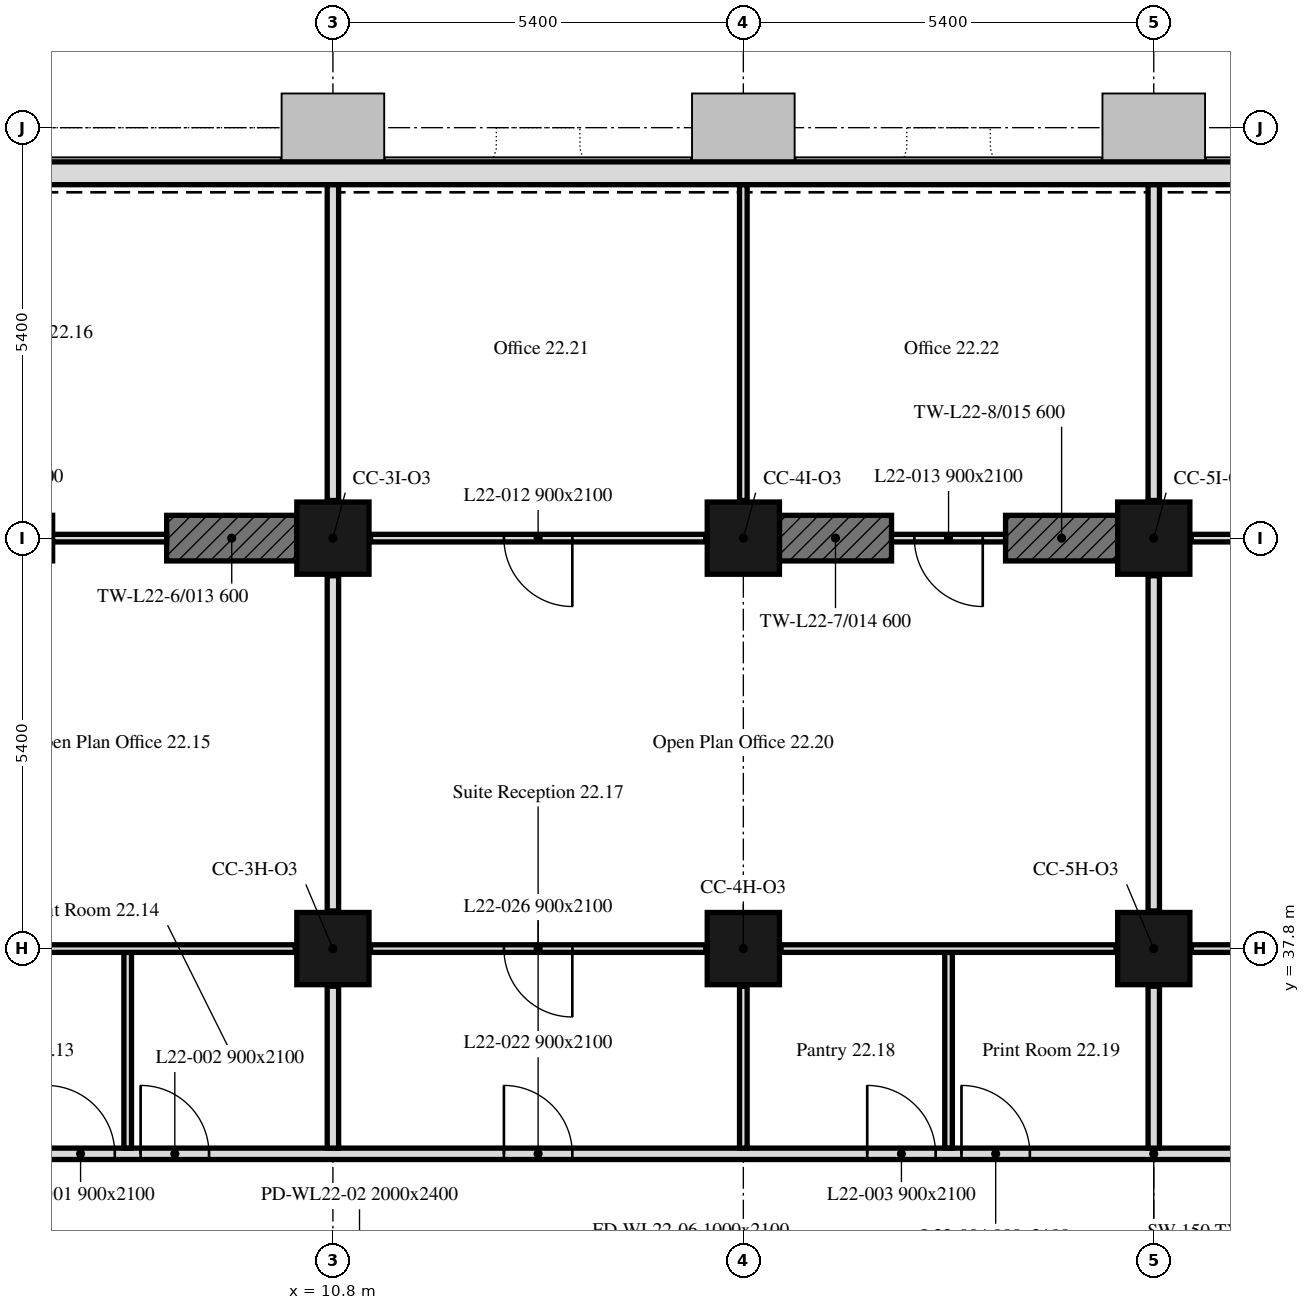
"""IFC4 building model, lengths in metres.
Left out: names, types, materials, properties, quantities, classifications, styles, units other than length and angle.
Written with IfcOpenShell. Run it as: python <this file> out.ifc"""

import sys

from ifc_helpers import new_model, si_unit, direction, frame, frame_2d, origin, origin_2d, place, context, subcontext, project, spatial, rectangle, extrude, element, fill, save


model = new_model("IFC4")
c1 = context("Model", 3, precision=1e-05, world=origin(), true_north=direction((0.0, 1.0)))
c2 = subcontext(c1, "Body", "Model", "MODEL_VIEW")
j1 = project(units=[si_unit("LENGTHUNIT", "METRE"), si_unit("PLANEANGLEUNIT", "RADIAN")], contexts=[c1])
p1 = place(None, origin())
s1 = spatial("IfcSite", under=j1, at=p1, CompositionType="ELEMENT")
p2 = place(p1, origin())
s2 = spatial("IfcBuilding", under=s1, at=p2, CompositionType="ELEMENT")
p3 = place(p2, frame((0.0, 0.0, 95.4)))
s3 = spatial("IfcBuildingStorey", under=s2, at=p3, CompositionType="ELEMENT", Elevation=95.4)
for number, where, z_axis, x_axis in (
    (1, (10.8, 37.8, 0.0), (0.0, 0.0, 1.0), (1.0, 0.0, 0.0)),
    (2, (16.2, 37.8, 0.0), (0.0, 0.0, 1.0), (1.0, 0.0, 0.0)),
    (3, (21.6, 37.8, 0.0), (0.0, 0.0, 1.0), (1.0, 0.0, 0.0)),
    (4, (10.8, 43.2, 0.0), (0.0, 0.0, 1.0), (1.0, 0.0, 0.0)),
    (5, (16.2, 43.2, 0.0), (0.0, 0.0, 1.0), (1.0, 0.0, 0.0)),
    (6, (21.6, 43.2, 0.0), (0.0, 0.0, 1.0), (1.0, 0.0, 0.0)),
):
    element("IfcColumn", number, at=place(p3, frame(where, z_axis=z_axis, x_axis=x_axis)), inside=s3, PredefinedType="COLUMN", context=c2, shape_type="SweptSolid", body=[
        extrude(rectangle(XDim=0.95, YDim=0.95, at=origin_2d()), origin(), (0.0, 0.0, 1.0), 3.5),
    ])
p4 = place(p3, frame((5.4, 43.2, 0.0), z_axis=(0.0, 0.0, 1.0), x_axis=(1.0, 0.0, 0.0)))
e7 = element("IfcWall", 7, at=p4, inside=s3, PredefinedType="SHEAR", context=c2, shape_type="SweptSolid", body=[
    extrude(rectangle(XDim=1.713, YDim=0.6, at=frame_2d((0.856, 0.0))), origin(), (0.0, 0.0, 1.0), 3.5),
])
p5 = place(p3, frame((8.613, 43.2, 0.0), z_axis=(0.0, 0.0, 1.0), x_axis=(1.0, 0.0, 0.0)))
e8 = element("IfcWall", 8, at=p5, inside=s3, PredefinedType="SHEAR", context=c2, shape_type="SweptSolid", body=[
    extrude(rectangle(XDim=1.712, YDim=0.6, at=frame_2d((0.856, 0.0))), origin(), (0.0, 0.0, 1.0), 3.5),
])
p6 = place(p3, frame((16.675, 43.2, 0.0), z_axis=(0.0, 0.0, 1.0), x_axis=(1.0, 0.0, 0.0)))
e9 = element("IfcWall", 9, at=p6, inside=s3, PredefinedType="SHEAR", context=c2, shape_type="SweptSolid", body=[
    extrude(rectangle(XDim=1.475, YDim=0.6, at=frame_2d((0.737, 0.0))), origin(), (0.0, 0.0, 1.0), 3.5),
])
p7 = place(p3, frame((19.65, 43.2, 0.0), z_axis=(0.0, 0.0, 1.0), x_axis=(1.0, 0.0, 0.0)))
e10 = element("IfcWall", 10, at=p7, inside=s3, PredefinedType="SHEAR", context=c2, shape_type="SweptSolid", body=[
    extrude(rectangle(XDim=1.475, YDim=0.6, at=frame_2d((0.738, 0.0))), origin(), (0.0, 0.0, 1.0), 3.5),
])
p8 = place(p3, frame((37.614, 48.0, 0.0), z_axis=(0.0, 0.0, 1.0), x_axis=(-1.0, 0.0, 0.0)))
e11 = element("IfcWall", 11, at=p8, inside=s3, PredefinedType="SOLIDWALL", context=c2, shape_type="SweptSolid", body=[
    extrude(rectangle(XDim=32.027, YDim=0.3, at=frame_2d((16.014, 0.0))), origin(), (0.0, 0.0, 1.0), 3.5),
])
p9 = place(p8, frame((0.814, 0.0, 0.9)))
e12 = element("IfcOpeningElement", 12, at=p9, cuts=e11, PredefinedType="OPENING", context=c2, shape_type="SweptSolid", body=[
    extrude(rectangle(XDim=3.4, YDim=1.7, at=frame_2d((1.7, 0.85))), frame((0.0, 0.16, 0.0), z_axis=(0.0, -1.0, 0.0), x_axis=(1.0, 0.0, 0.0)), (0.0, 0.0, 1.0), 0.32),
])
p10 = place(p3, frame((0.751, 35.1, 0.0), z_axis=(0.0, 0.0, 1.0), x_axis=(1.0, 0.0, 0.0)))
e13 = element("IfcWall", 13, at=p10, inside=s3, PredefinedType="PARTITIONING", context=c2, shape_type="SweptSolid", body=[
    extrude(rectangle(XDim=41.698, YDim=0.15, at=frame_2d((20.849, 0.0))), origin(), (0.0, 0.0, 1.0), 2.75),
])
p11 = place(p10, frame((6.279, 0.0, 0.0)))
e14 = element("IfcOpeningElement", 14, at=p11, cuts=e13, PredefinedType="OPENING", context=c2, shape_type="SweptSolid", body=[
    extrude(rectangle(XDim=0.9, YDim=2.1, at=frame_2d((0.45, 1.05))), frame((0.0, 0.075, 0.0), z_axis=(0.0, -1.0, 0.0), x_axis=(1.0, 0.0, 0.0)), (0.0, 0.0, 1.0), 0.15),
])
p12 = place(p10, frame((7.519, 0.0, 0.0)))
e15 = element("IfcOpeningElement", 15, at=p12, cuts=e13, PredefinedType="OPENING", context=c2, shape_type="SweptSolid", body=[
    extrude(rectangle(XDim=0.9, YDim=2.1, at=frame_2d((0.45, 1.05))), frame((0.0, 0.075, 0.0), z_axis=(0.0, -1.0, 0.0), x_axis=(1.0, 0.0, 0.0)), (0.0, 0.0, 1.0), 0.15),
])
p13 = place(p10, frame((17.079, 0.0, 0.0)))
e16 = element("IfcOpeningElement", 16, at=p13, cuts=e13, PredefinedType="OPENING", context=c2, shape_type="SweptSolid", body=[
    extrude(rectangle(XDim=0.9, YDim=2.1, at=frame_2d((0.45, 1.05))), frame((0.0, 0.075, 0.0), z_axis=(0.0, -1.0, 0.0), x_axis=(1.0, 0.0, 0.0)), (0.0, 0.0, 1.0), 0.15),
])
p14 = place(p10, frame((18.319, 0.0, 0.0)))
e17 = element("IfcOpeningElement", 17, at=p14, cuts=e13, PredefinedType="OPENING", context=c2, shape_type="SweptSolid", body=[
    extrude(rectangle(XDim=0.9, YDim=2.1, at=frame_2d((0.45, 1.05))), frame((0.0, 0.075, 0.0), z_axis=(0.0, -1.0, 0.0), x_axis=(1.0, 0.0, 0.0)), (0.0, 0.0, 1.0), 0.15),
])
p15 = place(p10, frame((38.511, 0.0, 0.0)))
e18 = element("IfcOpeningElement", 18, at=p15, cuts=e13, PredefinedType="OPENING", context=c2, shape_type="SweptSolid", body=[
    extrude(rectangle(XDim=0.9, YDim=2.1, at=frame_2d((0.45, 1.05))), frame((0.0, 0.075, 0.0), z_axis=(0.0, -1.0, 0.0), x_axis=(1.0, 0.0, 0.0)), (0.0, 0.0, 1.0), 0.15),
])
p16 = place(p10, frame((39.919, 0.0, 0.0)))
e19 = element("IfcOpeningElement", 19, at=p16, cuts=e13, PredefinedType="OPENING", context=c2, shape_type="SweptSolid", body=[
    extrude(rectangle(XDim=0.9, YDim=2.1, at=frame_2d((0.45, 1.05))), frame((0.0, 0.075, 0.0), z_axis=(0.0, -1.0, 0.0), x_axis=(1.0, 0.0, 0.0)), (0.0, 0.0, 1.0), 0.15),
])
p17 = place(p10, frame((2.174, 0.0, 0.0)))
e20 = element("IfcOpeningElement", 20, at=p17, cuts=e13, PredefinedType="OPENING", context=c2, shape_type="SweptSolid", body=[
    extrude(rectangle(XDim=0.9, YDim=2.1, at=frame_2d((0.45, 1.05))), frame((0.0, 0.075, 0.0), z_axis=(0.0, -1.0, 0.0), x_axis=(1.0, 0.0, 0.0)), (0.0, 0.0, 1.0), 0.15),
])
p18 = place(p10, frame((12.299, 0.0, 0.0)))
e21 = element("IfcOpeningElement", 21, at=p18, cuts=e13, PredefinedType="OPENING", context=c2, shape_type="SweptSolid", body=[
    extrude(rectangle(XDim=0.9, YDim=2.1, at=frame_2d((0.45, 1.05))), frame((0.0, 0.075, 0.0), z_axis=(0.0, -1.0, 0.0), x_axis=(1.0, 0.0, 0.0)), (0.0, 0.0, 1.0), 0.15),
])
p19 = place(p10, frame((23.099, 0.0, 0.0)))
e22 = element("IfcOpeningElement", 22, at=p19, cuts=e13, PredefinedType="OPENING", context=c2, shape_type="SweptSolid", body=[
    extrude(rectangle(XDim=0.9, YDim=2.1, at=frame_2d((0.45, 1.05))), frame((0.0, 0.075, 0.0), z_axis=(0.0, -1.0, 0.0), x_axis=(1.0, 0.0, 0.0)), (0.0, 0.0, 1.0), 0.15),
])
p20 = place(p3, frame((8.1, 35.175, 0.0), z_axis=(0.0, 0.0, 1.0), x_axis=(0.0, 1.0, 0.0)))
e23 = element("IfcWall", 23, at=p20, inside=s3, PredefinedType="PARTITIONING", context=c2, shape_type="SweptSolid", body=[
    extrude(rectangle(XDim=2.575, YDim=0.1, at=frame_2d((1.288, 0.0))), origin(), (0.0, 0.0, 1.0), 3.5),
])
p21 = place(p3, frame((10.8, 35.175, 0.0), z_axis=(0.0, 0.0, 1.0), x_axis=(0.0, 1.0, 0.0)))
e24 = element("IfcWall", 24, at=p21, inside=s3, PredefinedType="PARTITIONING", context=c2, shape_type="SweptSolid", body=[
    extrude(rectangle(XDim=2.13, YDim=0.15, at=frame_2d((1.065, 0.0))), origin(), (0.0, 0.0, 1.0), 2.75),
])
p22 = place(p3, frame((10.305, 37.8, 0.0), z_axis=(0.0, 0.0, 1.0), x_axis=(-1.0, 0.0, 0.0)))
e25 = element("IfcWall", 25, at=p22, inside=s3, PredefinedType="PARTITIONING", context=c2, shape_type="SweptSolid", body=[
    extrude(rectangle(XDim=4.41, YDim=0.1, at=frame_2d((2.205, 0.0))), origin(), (0.0, 0.0, 1.0), 2.75),
])
p23 = place(p3, frame((8.613, 43.2, 0.0), z_axis=(0.0, 0.0, 1.0), x_axis=(-1.0, 0.0, 0.0)))
e26 = element("IfcWall", 26, at=p23, inside=s3, PredefinedType="PARTITIONING", context=c2, shape_type="SweptSolid", body=[
    extrude(rectangle(XDim=1.5, YDim=0.1, at=frame_2d((0.75, 0.0))), origin(), (0.0, 0.0, 1.0), 3.5),
])
p24 = place(p3, frame((10.8, 38.295, 0.0), z_axis=(0.0, 0.0, 1.0), x_axis=(0.0, 1.0, 0.0)))
e27 = element("IfcWall", 27, at=p24, inside=s3, PredefinedType="PARTITIONING", context=c2, shape_type="SweptSolid", body=[
    extrude(rectangle(XDim=4.41, YDim=0.15, at=frame_2d((2.205, 0.0))), origin(), (0.0, 0.0, 1.0), 2.75),
])
p25 = place(p3, frame((10.8, 43.695, 0.0), z_axis=(0.0, 0.0, 1.0), x_axis=(0.0, 1.0, 0.0)))
e28 = element("IfcWall", 28, at=p25, inside=s3, PredefinedType="PARTITIONING", context=c2, shape_type="SweptSolid", body=[
    extrude(rectangle(XDim=4.154, YDim=0.15, at=frame_2d((2.077, 0.0))), origin(), (0.0, 0.0, 1.0), 2.75),
])
p26 = place(p3, frame((16.2, 35.175, 0.0), z_axis=(0.0, 0.0, 1.0), x_axis=(0.0, 1.0, 0.0)))
e29 = element("IfcWall", 29, at=p26, inside=s3, PredefinedType="PARTITIONING", context=c2, shape_type="SweptSolid", body=[
    extrude(rectangle(XDim=2.13, YDim=0.1, at=frame_2d((1.065, 0.0))), origin(), (0.0, 0.0, 1.0), 2.75),
])
p27 = place(p3, frame((15.705, 37.8, 0.0), z_axis=(0.0, 0.0, 1.0), x_axis=(-1.0, 0.0, 0.0)))
e30 = element("IfcWall", 30, at=p27, inside=s3, PredefinedType="PARTITIONING", context=c2, shape_type="SweptSolid", body=[
    extrude(rectangle(XDim=4.41, YDim=0.1, at=frame_2d((2.205, 0.0))), origin(), (0.0, 0.0, 1.0), 2.75),
])
p28 = place(p27, frame((1.755, 0.0, 0.0)))
e31 = element("IfcOpeningElement", 31, at=p28, cuts=e30, PredefinedType="OPENING", context=c2, shape_type="SweptSolid", body=[
    extrude(rectangle(XDim=0.9, YDim=2.1, at=frame_2d((0.45, 1.05))), frame((0.0, 0.05, 0.0), z_axis=(0.0, -1.0, 0.0), x_axis=(1.0, 0.0, 0.0)), (0.0, 0.0, 1.0), 0.1),
])
p29 = place(p3, frame((18.9, 35.175, 0.0), z_axis=(0.0, 0.0, 1.0), x_axis=(0.0, 1.0, 0.0)))
e32 = element("IfcWall", 32, at=p29, inside=s3, PredefinedType="PARTITIONING", context=c2, shape_type="SweptSolid", body=[
    extrude(rectangle(XDim=2.575, YDim=0.1, at=frame_2d((1.288, 0.0))), origin(), (0.0, 0.0, 1.0), 3.5),
])
p30 = place(p3, frame((21.6, 35.175, 0.0), z_axis=(0.0, 0.0, 1.0), x_axis=(0.0, 1.0, 0.0)))
e33 = element("IfcWall", 33, at=p30, inside=s3, PredefinedType="PARTITIONING", context=c2, shape_type="SweptSolid", body=[
    extrude(rectangle(XDim=2.13, YDim=0.15, at=frame_2d((1.065, 0.0))), origin(), (0.0, 0.0, 1.0), 2.75),
])
p31 = place(p3, frame((21.105, 37.8, 0.0), z_axis=(0.0, 0.0, 1.0), x_axis=(-1.0, 0.0, 0.0)))
e34 = element("IfcWall", 34, at=p31, inside=s3, PredefinedType="PARTITIONING", context=c2, shape_type="SweptSolid", body=[
    extrude(rectangle(XDim=4.41, YDim=0.1, at=frame_2d((2.205, 0.0))), origin(), (0.0, 0.0, 1.0), 3.5),
])
p32 = place(p3, frame((21.6, 38.295, 0.0), z_axis=(0.0, 0.0, 1.0), x_axis=(0.0, 1.0, 0.0)))
e35 = element("IfcWall", 35, at=p32, inside=s3, PredefinedType="PARTITIONING", context=c2, shape_type="SweptSolid", body=[
    extrude(rectangle(XDim=4.41, YDim=0.15, at=frame_2d((2.205, 0.0))), origin(), (0.0, 0.0, 1.0), 2.75),
])
p33 = place(p3, frame((19.65, 43.2, 0.0), z_axis=(0.0, 0.0, 1.0), x_axis=(-1.0, 0.0, 0.0)))
e36 = element("IfcWall", 36, at=p33, inside=s3, PredefinedType="PARTITIONING", context=c2, shape_type="SweptSolid", body=[
    extrude(rectangle(XDim=1.5, YDim=0.1, at=frame_2d((0.75, 0.0))), origin(), (0.0, 0.0, 1.0), 3.5),
])
p34 = place(p33, frame((0.3, 0.0, 0.0)))
e37 = element("IfcOpeningElement", 37, at=p34, cuts=e36, PredefinedType="OPENING", context=c2, shape_type="SweptSolid", body=[
    extrude(rectangle(XDim=0.9, YDim=2.1, at=frame_2d((0.45, 1.05))), frame((0.0, 0.05, 0.0), z_axis=(0.0, -1.0, 0.0), x_axis=(1.0, 0.0, 0.0)), (0.0, 0.0, 1.0), 0.1),
])
p35 = place(p3, frame((15.705, 43.2, 0.0), z_axis=(0.0, 0.0, 1.0), x_axis=(-1.0, 0.0, 0.0)))
e38 = element("IfcWall", 38, at=p35, inside=s3, PredefinedType="PARTITIONING", context=c2, shape_type="SweptSolid", body=[
    extrude(rectangle(XDim=4.41, YDim=0.1, at=frame_2d((2.205, 0.0))), origin(), (0.0, 0.0, 1.0), 3.5),
])
p36 = place(p35, frame((1.755, 0.0, 0.0)))
e39 = element("IfcOpeningElement", 39, at=p36, cuts=e38, PredefinedType="OPENING", context=c2, shape_type="SweptSolid", body=[
    extrude(rectangle(XDim=0.9, YDim=2.1, at=frame_2d((0.45, 1.05))), frame((0.0, 0.05, 0.0), z_axis=(0.0, -1.0, 0.0), x_axis=(1.0, 0.0, 0.0)), (0.0, 0.0, 1.0), 0.1),
])
p37 = place(p3, frame((16.2, 47.849, 0.0), z_axis=(0.0, 0.0, 1.0), x_axis=(0.0, -1.0, 0.0)))
e40 = element("IfcWall", 40, at=p37, inside=s3, PredefinedType="PARTITIONING", context=c2, shape_type="SweptSolid", body=[
    extrude(rectangle(XDim=4.154, YDim=0.1, at=frame_2d((2.077, 0.0))), origin(), (0.0, 0.0, 1.0), 2.75),
])
p38 = place(p3, frame((21.6, 47.849, 0.0), z_axis=(0.0, 0.0, 1.0), x_axis=(0.0, -1.0, 0.0)))
e41 = element("IfcWall", 41, at=p38, inside=s3, PredefinedType="PARTITIONING", context=c2, shape_type="SweptSolid", body=[
    extrude(rectangle(XDim=4.154, YDim=0.15, at=frame_2d((2.077, 0.0))), origin(), (0.0, 0.0, 1.0), 2.75),
])
p39 = place(p3, frame((26.505, 37.8, 0.0), z_axis=(0.0, 0.0, 1.0), x_axis=(-1.0, 0.0, 0.0)))
e42 = element("IfcWall", 42, at=p39, inside=s3, PredefinedType="PARTITIONING", context=c2, shape_type="SweptSolid", body=[
    extrude(rectangle(XDim=4.41, YDim=0.1, at=frame_2d((2.205, 0.0))), origin(), (0.0, 0.0, 1.0), 3.5),
])
p40 = place(p39, frame((1.755, 0.0, 0.0)))
e43 = element("IfcOpeningElement", 43, at=p40, cuts=e42, PredefinedType="OPENING", context=c2, shape_type="SweptSolid", body=[
    extrude(rectangle(XDim=0.9, YDim=2.1, at=frame_2d((0.45, 1.05))), frame((0.0, 0.05, 0.0), z_axis=(0.0, -1.0, 0.0), x_axis=(1.0, 0.0, 0.0)), (0.0, 0.0, 1.0), 0.1),
])
p41 = place(p3, frame((26.505, 43.2, 0.0), z_axis=(0.0, 0.0, 1.0), x_axis=(-1.0, 0.0, 0.0)))
e44 = element("IfcWall", 44, at=p41, inside=s3, PredefinedType="PARTITIONING", context=c2, shape_type="SweptSolid", body=[
    extrude(rectangle(XDim=4.41, YDim=0.1, at=frame_2d((2.205, 0.0))), origin(), (0.0, 0.0, 1.0), 3.5),
])
p42 = place(p41, frame((1.755, 0.0, 0.0)))
e45 = element("IfcOpeningElement", 45, at=p42, cuts=e44, PredefinedType="OPENING", context=c2, shape_type="SweptSolid", body=[
    extrude(rectangle(XDim=0.9, YDim=2.1, at=frame_2d((0.45, 1.05))), frame((0.0, 0.05, 0.0), z_axis=(0.0, -1.0, 0.0), x_axis=(1.0, 0.0, 0.0)), (0.0, 0.0, 1.0), 0.1),
])
p43 = place(p11, origin())
e46 = element("IfcDoor", 46, at=p43, inside=s3, OperationType="SINGLE_SWING_RIGHT", PredefinedType="DOOR", context=c2, shape_type="SweptSolid", body=[
    extrude(rectangle(XDim=0.9, YDim=2.1, at=frame_2d((0.45, 1.05))), frame((0.0, 0.025, 0.0), z_axis=(0.0, -1.0, 0.0), x_axis=(1.0, 0.0, 0.0)), (0.0, 0.0, 1.0), 0.05),
])
fill(e14, e46)
p44 = place(p12, origin())
e47 = element("IfcDoor", 47, at=p44, inside=s3, OperationType="SINGLE_SWING_RIGHT", PredefinedType="DOOR", context=c2, shape_type="SweptSolid", body=[
    extrude(rectangle(XDim=0.9, YDim=2.1, at=frame_2d((0.45, 1.05))), frame((0.0, 0.025, 0.0), z_axis=(0.0, -1.0, 0.0), x_axis=(1.0, 0.0, 0.0)), (0.0, 0.0, 1.0), 0.05),
])
fill(e15, e47)
p45 = place(p13, origin())
e48 = element("IfcDoor", 48, at=p45, inside=s3, OperationType="SINGLE_SWING_RIGHT", PredefinedType="DOOR", context=c2, shape_type="SweptSolid", body=[
    extrude(rectangle(XDim=0.9, YDim=2.1, at=frame_2d((0.45, 1.05))), frame((0.0, 0.025, 0.0), z_axis=(0.0, -1.0, 0.0), x_axis=(1.0, 0.0, 0.0)), (0.0, 0.0, 1.0), 0.05),
])
fill(e16, e48)
p46 = place(p14, origin())
e49 = element("IfcDoor", 49, at=p46, inside=s3, OperationType="SINGLE_SWING_RIGHT", PredefinedType="DOOR", context=c2, shape_type="SweptSolid", body=[
    extrude(rectangle(XDim=0.9, YDim=2.1, at=frame_2d((0.45, 1.05))), frame((0.0, 0.025, 0.0), z_axis=(0.0, -1.0, 0.0), x_axis=(1.0, 0.0, 0.0)), (0.0, 0.0, 1.0), 0.05),
])
fill(e17, e49)
p47 = place(p36, origin())
e50 = element("IfcDoor", 50, at=p47, inside=s3, OperationType="SINGLE_SWING_RIGHT", PredefinedType="DOOR", context=c2, shape_type="SweptSolid", body=[
    extrude(rectangle(XDim=0.9, YDim=2.1, at=frame_2d((0.45, 1.05))), frame((0.0, 0.025, 0.0), z_axis=(0.0, -1.0, 0.0), x_axis=(1.0, 0.0, 0.0)), (0.0, 0.0, 1.0), 0.05),
])
fill(e39, e50)
p48 = place(p34, origin())
e51 = element("IfcDoor", 51, at=p48, inside=s3, OperationType="SINGLE_SWING_RIGHT", PredefinedType="DOOR", context=c2, shape_type="SweptSolid", body=[
    extrude(rectangle(XDim=0.9, YDim=2.1, at=frame_2d((0.45, 1.05))), frame((0.0, 0.025, 0.0), z_axis=(0.0, -1.0, 0.0), x_axis=(1.0, 0.0, 0.0)), (0.0, 0.0, 1.0), 0.05),
])
fill(e37, e51)
p49 = place(p18, origin())
e52 = element("IfcDoor", 52, at=p49, inside=s3, OperationType="SINGLE_SWING_RIGHT", PredefinedType="DOOR", context=c2, shape_type="SweptSolid", body=[
    extrude(rectangle(XDim=0.9, YDim=2.1, at=frame_2d((0.45, 1.05))), frame((0.0, 0.025, 0.0), z_axis=(0.0, -1.0, 0.0), x_axis=(1.0, 0.0, 0.0)), (0.0, 0.0, 1.0), 0.05),
])
fill(e21, e52)
p50 = place(p28, origin())
e53 = element("IfcDoor", 53, at=p50, inside=s3, OperationType="SINGLE_SWING_LEFT", PredefinedType="DOOR", context=c2, shape_type="SweptSolid", body=[
    extrude(rectangle(XDim=0.9, YDim=2.1, at=frame_2d((0.45, 1.05))), frame((0.0, 0.025, 0.0), z_axis=(0.0, -1.0, 0.0), x_axis=(1.0, 0.0, 0.0)), (0.0, 0.0, 1.0), 0.05),
])
fill(e31, e53)
save(model, sys.argv[1])
